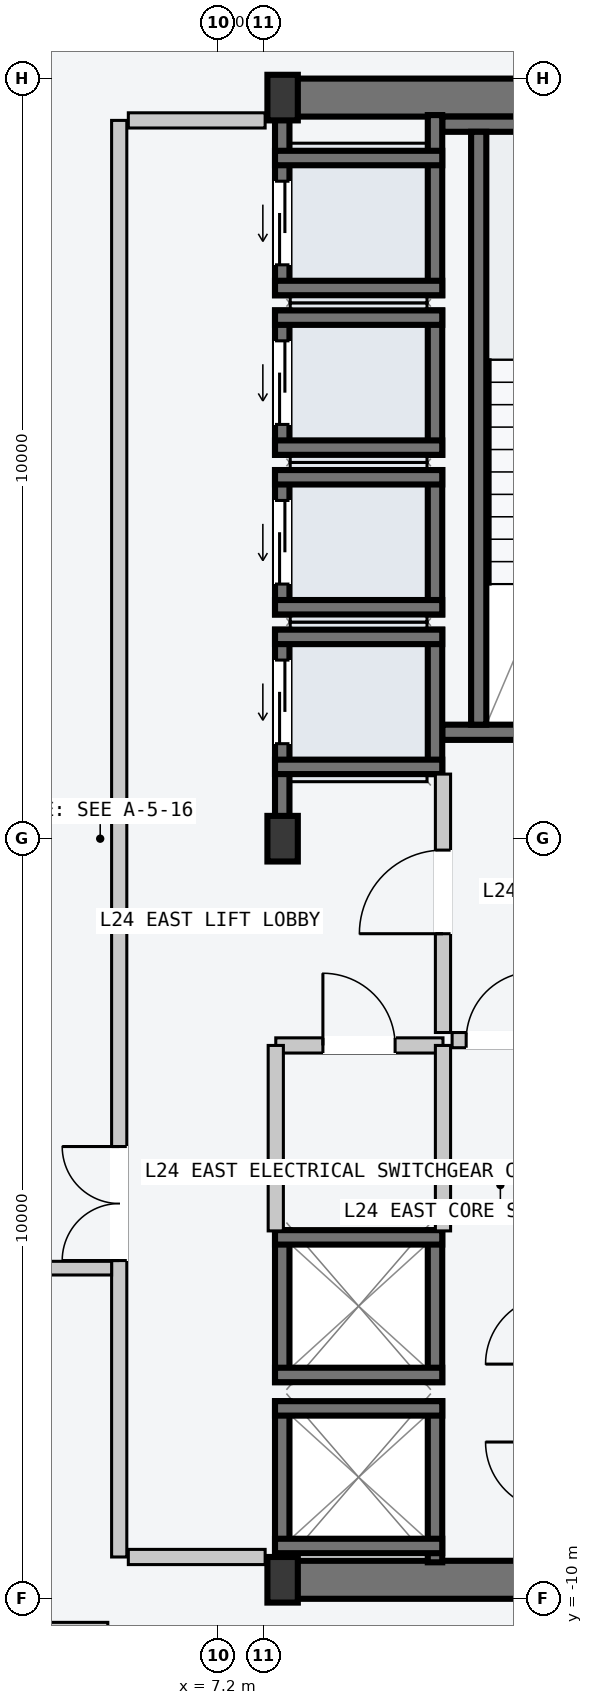
"""IFC4 building model, lengths in metres.
Left out: names, types, materials, properties, quantities, classifications, styles, units other than length and angle.
Written with IfcOpenShell. Run it as: python <this file> out.ifc"""

import sys

from ifc_helpers import new_model, si_unit, direction, frame, frame_2d, origin, origin_2d, place, context, subcontext, project, spatial, rectangle, i_section, extrude, element, fill, save


model = new_model("IFC4")
c1 = context("Model", 3, precision=1e-05, world=origin(), true_north=direction((0.0, 1.0)))
c2 = subcontext(c1, "Body", "Model", "MODEL_VIEW")
j1 = project(units=[si_unit("LENGTHUNIT", "METRE"), si_unit("PLANEANGLEUNIT", "RADIAN")], contexts=[c1])
p1 = place(None, origin())
s1 = spatial("IfcSite", under=j1, at=p1, CompositionType="ELEMENT")
p2 = place(p1, origin())
s2 = spatial("IfcBuilding", under=s1, at=p2, CompositionType="ELEMENT")
p3 = place(p2, frame((0.0, 0.0, 95.4)))
s3 = spatial("IfcBuildingStorey", under=s2, at=p3, CompositionType="ELEMENT", Elevation=95.4)
for number, where, z_axis, x_axis in (
    (1, (8.07, -9.75, -0.2), (0.0, 0.0, 1.0), (1.0, 0.0, 0.0)),
    (2, (8.07, 9.75, -0.2), (0.0, 0.0, 1.0), (1.0, 0.0, 0.0)),
):
    element("IfcWall", number, at=place(p3, frame(where, z_axis=z_axis, x_axis=x_axis)), inside=s3, PredefinedType="SHEAR", context=c2, shape_type="SweptSolid", body=[
        extrude(rectangle(XDim=6.46, YDim=0.5, at=frame_2d((3.23, 0.0))), origin(), (0.0, 0.0, 1.0), 3.6),
    ])
p4 = place(p3, frame((10.15, 1.4, -0.2), z_axis=(0.0, 0.0, 1.0), x_axis=(1.0, 0.0, 0.0)))
e3 = element("IfcWall", 3, at=p4, inside=s3, PredefinedType="SOLIDWALL", context=c2, shape_type="SweptSolid", body=[
    extrude(rectangle(XDim=4.1, YDim=0.2, at=frame_2d((2.05, 0.0))), origin(), (0.0, 0.0, 1.0), 3.6),
])
p5 = place(p4, frame((1.5, 0.0, 0.2)))
e4 = element("IfcOpeningElement", 4, at=p5, cuts=e3, PredefinedType="OPENING", context=c2, shape_type="SweptSolid", body=[
    extrude(rectangle(XDim=1.12, YDim=2.18, at=frame_2d((0.56, 1.09))), frame((0.0, 0.11, 0.0), z_axis=(0.0, -1.0, 0.0), x_axis=(1.0, 0.0, 0.0)), (0.0, 0.0, 1.0), 0.22),
])
p6 = place(p3, frame((10.15, 9.4, -0.2), z_axis=(0.0, 0.0, 1.0), x_axis=(1.0, 0.0, 0.0)))
e5 = element("IfcWall", 5, at=p6, inside=s3, PredefinedType="SOLIDWALL", context=c2, shape_type="SweptSolid", body=[
    extrude(rectangle(XDim=4.1, YDim=0.2, at=frame_2d((2.05, 0.0))), origin(), (0.0, 0.0, 1.0), 3.6),
])
p7 = place(p3, frame((10.63, 1.5, -0.2), z_axis=(0.0, 0.0, 1.0), x_axis=(0.0, 1.0, 0.0)))
e6 = element("IfcWall", 6, at=p7, inside=s3, PredefinedType="SOLIDWALL", context=c2, shape_type="SweptSolid", body=[
    extrude(rectangle(XDim=7.8, YDim=0.2, at=frame_2d((3.9, 0.0))), origin(), (0.0, 0.0, 1.0), 3.6),
])
for number, where, z_axis, x_axis in (
    (7, (8.05, -9.75, 0.0), (0.0, 0.0, 1.0), (1.0, 0.0, 0.0)),
    (8, (8.05, 0.0, 0.0), (0.0, 0.0, 1.0), (1.0, 0.0, 0.0)),
    (9, (8.05, 9.75, 0.0), (0.0, 0.0, 1.0), (1.0, 0.0, 0.0)),
):
    element("IfcColumn", number, at=place(p3, frame(where, z_axis=z_axis, x_axis=x_axis)), inside=s3, PredefinedType="COLUMN", context=c2, shape_type="SweptSolid", body=[
        extrude(i_section(OverallWidth=0.4, OverallDepth=0.6, WebThickness=0.022, FlangeThickness=0.036, at=origin_2d()), origin(), (0.0, 0.0, 1.0), 3.6),
    ])
p8 = place(p3, frame((8.045, 0.21, -0.2), z_axis=(0.0, 0.0, 1.0), x_axis=(0.0, 1.0, 0.0)))
e10 = element("IfcWall", 10, at=p8, inside=s3, PredefinedType="SOLIDWALL", context=c2, shape_type="SweptSolid", body=[
    extrude(rectangle(XDim=2.54, YDim=0.19, at=frame_2d((1.27, 0.0))), origin(), (0.0, 0.0, 1.0), 3.6),
])
p9 = place(p8, frame((1.04, 0.0, 0.2)))
e11 = element("IfcOpeningElement", 11, at=p9, cuts=e10, PredefinedType="OPENING", context=c2, shape_type="SweptSolid", body=[
    extrude(rectangle(XDim=1.1, YDim=2.2, at=frame_2d((0.55, 1.1))), frame((0.0, 0.105, 0.0), z_axis=(0.0, -1.0, 0.0), x_axis=(1.0, 0.0, 0.0)), (0.0, 0.0, 1.0), 0.21),
])
p10 = place(p3, frame((10.055, 0.85, -0.2), z_axis=(0.0, 0.0, 1.0), x_axis=(0.0, 1.0, 0.0)))
e12 = element("IfcWall", 12, at=p10, inside=s3, PredefinedType="SOLIDWALL", context=c2, shape_type="SweptSolid", body=[
    extrude(rectangle(XDim=1.9, YDim=0.19, at=frame_2d((0.95, 0.0))), origin(), (0.0, 0.0, 1.0), 3.6),
])
for number, where, z_axis, x_axis in (
    (13, (7.95, 2.655, -0.2), (0.0, 0.0, 1.0), (1.0, 0.0, 0.0)),
    (14, (7.95, 0.945, -0.2), (0.0, 0.0, 1.0), (1.0, 0.0, 0.0)),
):
    element("IfcWall", number, at=place(p3, frame(where, z_axis=z_axis, x_axis=x_axis)), inside=s3, PredefinedType="SOLIDWALL", context=c2, shape_type="SweptSolid", body=[
        extrude(rectangle(XDim=2.2, YDim=0.19, at=frame_2d((1.1, 0.0))), origin(), (0.0, 0.0, 1.0), 3.6),
    ])
p11 = place(p3, frame((8.045, 2.95, -0.2), z_axis=(0.0, 0.0, 1.0), x_axis=(0.0, 1.0, 0.0)))
e15 = element("IfcWall", 15, at=p11, inside=s3, PredefinedType="SOLIDWALL", context=c2, shape_type="SweptSolid", body=[
    extrude(rectangle(XDim=1.9, YDim=0.19, at=frame_2d((0.95, 0.0))), origin(), (0.0, 0.0, 1.0), 3.6),
])
p12 = place(p11, frame((0.4, 0.0, 0.2)))
e16 = element("IfcOpeningElement", 16, at=p12, cuts=e15, PredefinedType="OPENING", context=c2, shape_type="SweptSolid", body=[
    extrude(rectangle(XDim=1.1, YDim=2.2, at=frame_2d((0.55, 1.1))), frame((0.0, 0.105, 0.0), z_axis=(0.0, -1.0, 0.0), x_axis=(1.0, 0.0, 0.0)), (0.0, 0.0, 1.0), 0.21),
])
p13 = place(p3, frame((10.055, 2.95, -0.2), z_axis=(0.0, 0.0, 1.0), x_axis=(0.0, 1.0, 0.0)))
e17 = element("IfcWall", 17, at=p13, inside=s3, PredefinedType="SOLIDWALL", context=c2, shape_type="SweptSolid", body=[
    extrude(rectangle(XDim=1.9, YDim=0.19, at=frame_2d((0.95, 0.0))), origin(), (0.0, 0.0, 1.0), 3.6),
])
for number, where, z_axis, x_axis in (
    (18, (7.95, 4.755, -0.2), (0.0, 0.0, 1.0), (1.0, 0.0, 0.0)),
    (19, (7.95, 3.045, -0.2), (0.0, 0.0, 1.0), (1.0, 0.0, 0.0)),
):
    element("IfcWall", number, at=place(p3, frame(where, z_axis=z_axis, x_axis=x_axis)), inside=s3, PredefinedType="SOLIDWALL", context=c2, shape_type="SweptSolid", body=[
        extrude(rectangle(XDim=2.2, YDim=0.19, at=frame_2d((1.1, 0.0))), origin(), (0.0, 0.0, 1.0), 3.6),
    ])
p14 = place(p3, frame((8.045, 5.05, -0.2), z_axis=(0.0, 0.0, 1.0), x_axis=(0.0, 1.0, 0.0)))
e20 = element("IfcWall", 20, at=p14, inside=s3, PredefinedType="SOLIDWALL", context=c2, shape_type="SweptSolid", body=[
    extrude(rectangle(XDim=1.9, YDim=0.19, at=frame_2d((0.95, 0.0))), origin(), (0.0, 0.0, 1.0), 3.6),
])
p15 = place(p14, frame((0.4, 0.0, 0.2)))
e21 = element("IfcOpeningElement", 21, at=p15, cuts=e20, PredefinedType="OPENING", context=c2, shape_type="SweptSolid", body=[
    extrude(rectangle(XDim=1.1, YDim=2.2, at=frame_2d((0.55, 1.1))), frame((0.0, 0.105, 0.0), z_axis=(0.0, -1.0, 0.0), x_axis=(1.0, 0.0, 0.0)), (0.0, 0.0, 1.0), 0.21),
])
p16 = place(p3, frame((10.055, 5.05, -0.2), z_axis=(0.0, 0.0, 1.0), x_axis=(0.0, 1.0, 0.0)))
e22 = element("IfcWall", 22, at=p16, inside=s3, PredefinedType="SOLIDWALL", context=c2, shape_type="SweptSolid", body=[
    extrude(rectangle(XDim=1.9, YDim=0.19, at=frame_2d((0.95, 0.0))), origin(), (0.0, 0.0, 1.0), 3.6),
])
for number, where, z_axis, x_axis in (
    (23, (7.95, 6.855, -0.2), (0.0, 0.0, 1.0), (1.0, 0.0, 0.0)),
    (24, (7.95, 5.145, -0.2), (0.0, 0.0, 1.0), (1.0, 0.0, 0.0)),
):
    element("IfcWall", number, at=place(p3, frame(where, z_axis=z_axis, x_axis=x_axis)), inside=s3, PredefinedType="SOLIDWALL", context=c2, shape_type="SweptSolid", body=[
        extrude(rectangle(XDim=2.2, YDim=0.19, at=frame_2d((1.1, 0.0))), origin(), (0.0, 0.0, 1.0), 3.6),
    ])
p17 = place(p3, frame((8.045, 7.15, -0.2), z_axis=(0.0, 0.0, 1.0), x_axis=(0.0, 1.0, 0.0)))
e25 = element("IfcWall", 25, at=p17, inside=s3, PredefinedType="SOLIDWALL", context=c2, shape_type="SweptSolid", body=[
    extrude(rectangle(XDim=2.37, YDim=0.19, at=frame_2d((1.185, 0.0))), origin(), (0.0, 0.0, 1.0), 3.6),
])
p18 = place(p17, frame((0.4, 0.0, 0.2)))
e26 = element("IfcOpeningElement", 26, at=p18, cuts=e25, PredefinedType="OPENING", context=c2, shape_type="SweptSolid", body=[
    extrude(rectangle(XDim=1.1, YDim=2.2, at=frame_2d((0.55, 1.1))), frame((0.0, 0.105, 0.0), z_axis=(0.0, -1.0, 0.0), x_axis=(1.0, 0.0, 0.0)), (0.0, 0.0, 1.0), 0.21),
])
p19 = place(p3, frame((10.055, 7.15, -0.2), z_axis=(0.0, 0.0, 1.0), x_axis=(0.0, 1.0, 0.0)))
e27 = element("IfcWall", 27, at=p19, inside=s3, PredefinedType="SOLIDWALL", context=c2, shape_type="SweptSolid", body=[
    extrude(rectangle(XDim=2.37, YDim=0.19, at=frame_2d((1.185, 0.0))), origin(), (0.0, 0.0, 1.0), 3.6),
])
for number, where, z_axis, x_axis in (
    (28, (7.95, 8.955, -0.2), (0.0, 0.0, 1.0), (1.0, 0.0, 0.0)),
    (29, (7.95, 7.245, -0.2), (0.0, 0.0, 1.0), (1.0, 0.0, 0.0)),
):
    element("IfcWall", number, at=place(p3, frame(where, z_axis=z_axis, x_axis=x_axis)), inside=s3, PredefinedType="SOLIDWALL", context=c2, shape_type="SweptSolid", body=[
        extrude(rectangle(XDim=2.2, YDim=0.19, at=frame_2d((1.1, 0.0))), origin(), (0.0, 0.0, 1.0), 3.6),
    ])
for number, where, z_axis, x_axis in (
    (30, (8.045, -9.52, -0.2), (0.0, 0.0, 1.0), (0.0, 1.0, 0.0)),
    (31, (10.055, -9.52, -0.2), (0.0, 0.0, 1.0), (0.0, 1.0, 0.0)),
):
    element("IfcWall", number, at=place(p3, frame(where, z_axis=z_axis, x_axis=x_axis)), inside=s3, PredefinedType="SOLIDWALL", context=c2, shape_type="SweptSolid", body=[
        extrude(rectangle(XDim=2.12, YDim=0.19, at=frame_2d((1.06, 0.0))), origin(), (0.0, 0.0, 1.0), 3.6),
    ])
for number, where, z_axis, x_axis in (
    (32, (7.95, -7.495, -0.2), (0.0, 0.0, 1.0), (1.0, 0.0, 0.0)),
    (33, (7.95, -9.305, -0.2), (0.0, 0.0, 1.0), (1.0, 0.0, 0.0)),
):
    element("IfcWall", number, at=place(p3, frame(where, z_axis=z_axis, x_axis=x_axis)), inside=s3, PredefinedType="SOLIDWALL", context=c2, shape_type="SweptSolid", body=[
        extrude(rectangle(XDim=2.2, YDim=0.19, at=frame_2d((1.1, 0.0))), origin(), (0.0, 0.0, 1.0), 3.6),
    ])
for number, where, z_axis, x_axis in (
    (34, (8.045, -7.15, -0.2), (0.0, 0.0, 1.0), (0.0, 1.0, 0.0)),
    (35, (10.055, -7.15, -0.2), (0.0, 0.0, 1.0), (0.0, 1.0, 0.0)),
):
    element("IfcWall", number, at=place(p3, frame(where, z_axis=z_axis, x_axis=x_axis)), inside=s3, PredefinedType="SOLIDWALL", context=c2, shape_type="SweptSolid", body=[
        extrude(rectangle(XDim=2.0, YDim=0.19, at=frame_2d((1.0, 0.0))), origin(), (0.0, 0.0, 1.0), 3.6),
    ])
for number, where, z_axis, x_axis in (
    (36, (7.95, -5.245, -0.2), (0.0, 0.0, 1.0), (1.0, 0.0, 0.0)),
    (37, (7.95, -7.055, -0.2), (0.0, 0.0, 1.0), (1.0, 0.0, 0.0)),
):
    element("IfcWall", number, at=place(p3, frame(where, z_axis=z_axis, x_axis=x_axis)), inside=s3, PredefinedType="SOLIDWALL", context=c2, shape_type="SweptSolid", body=[
        extrude(rectangle(XDim=2.2, YDim=0.19, at=frame_2d((1.1, 0.0))), origin(), (0.0, 0.0, 1.0), 3.6),
    ])
p20 = place(p3, frame((5.9, -9.45, 0.0), z_axis=(0.0, 0.0, 1.0), x_axis=(0.0, 1.0, 0.0)))
e38 = element("IfcWall", 38, at=p20, inside=s3, PredefinedType="PARTITIONING", context=c2, shape_type="SweptSolid", body=[
    extrude(rectangle(XDim=18.9, YDim=0.2, at=frame_2d((9.45, 0.0))), origin(), (0.0, 0.0, 1.0), 3.4),
])
p21 = place(p20, frame((3.9, 0.0, 0.0)))
e39 = element("IfcOpeningElement", 39, at=p21, cuts=e38, PredefinedType="OPENING", context=c2, shape_type="SweptSolid", body=[
    extrude(rectangle(XDim=1.5, YDim=2.2, at=frame_2d((0.75, 1.1))), frame((0.0, 0.11, 0.0), z_axis=(0.0, -1.0, 0.0), x_axis=(1.0, 0.0, 0.0)), (0.0, 0.0, 1.0), 0.22),
])
for number, where, z_axis, x_axis in (
    (40, (6.02, -9.45, 0.0), (0.0, 0.0, 1.0), (1.0, 0.0, 0.0)),
    (41, (6.02, 9.45, 0.0), (0.0, 0.0, 1.0), (1.0, 0.0, 0.0)),
):
    element("IfcWall", number, at=place(p3, frame(where, z_axis=z_axis, x_axis=x_axis)), inside=s3, PredefinedType="PARTITIONING", context=c2, shape_type="SweptSolid", body=[
        extrude(rectangle(XDim=1.8, YDim=0.2, at=frame_2d((0.9, 0.0))), origin(), (0.0, 0.0, 1.0), 3.4),
    ])
p22 = place(p3, frame((10.16, -2.55, 0.0), z_axis=(0.0, 0.0, 1.0), x_axis=(0.0, 1.0, 0.0)))
e42 = element("IfcWall", 42, at=p22, inside=s3, PredefinedType="PARTITIONING", context=c2, shape_type="SweptSolid", body=[
    extrude(rectangle(XDim=3.4, YDim=0.2, at=frame_2d((1.7, 0.0))), origin(), (0.0, 0.0, 1.0), 3.4),
])
p23 = place(p22, frame((1.3, 0.0, 0.0)))
e43 = element("IfcOpeningElement", 43, at=p23, cuts=e42, PredefinedType="OPENING", context=c2, shape_type="SweptSolid", body=[
    extrude(rectangle(XDim=1.1, YDim=2.15, at=frame_2d((0.55, 1.075))), frame((0.0, 0.11, 0.0), z_axis=(0.0, -1.0, 0.0), x_axis=(1.0, 0.0, 0.0)), (0.0, 0.0, 1.0), 0.22),
])
p24 = place(p3, frame((10.28, -2.65, 0.0), z_axis=(0.0, 0.0, 1.0), x_axis=(1.0, 0.0, 0.0)))
e44 = element("IfcWall", 44, at=p24, inside=s3, PredefinedType="PARTITIONING", context=c2, shape_type="SweptSolid", body=[
    extrude(rectangle(XDim=1.27, YDim=0.2, at=frame_2d((0.635, 0.0))), origin(), (0.0, 0.0, 1.0), 3.4),
])
p25 = place(p24, frame((0.185, 0.0, 0.0)))
e45 = element("IfcOpeningElement", 45, at=p25, cuts=e44, PredefinedType="OPENING", context=c2, shape_type="SweptSolid", body=[
    extrude(rectangle(XDim=0.9, YDim=2.15, at=frame_2d((0.45, 1.075))), frame((0.0, 0.11, 0.0), z_axis=(0.0, -1.0, 0.0), x_axis=(1.0, 0.0, 0.0)), (0.0, 0.0, 1.0), 0.22),
])
p26 = place(p3, frame((7.96, -2.72, 0.0), z_axis=(0.0, 0.0, 1.0), x_axis=(1.0, 0.0, 0.0)))
e46 = element("IfcWall", 46, at=p26, inside=s3, PredefinedType="PARTITIONING", context=c2, shape_type="SweptSolid", body=[
    extrude(rectangle(XDim=2.2, YDim=0.2, at=frame_2d((1.1, 0.0))), origin(), (0.0, 0.0, 1.0), 3.4),
])
p27 = place(p26, frame((0.62, 0.0, 0.0)))
e47 = element("IfcOpeningElement", 47, at=p27, cuts=e46, PredefinedType="OPENING", context=c2, shape_type="SweptSolid", body=[
    extrude(rectangle(XDim=0.95, YDim=2.1, at=frame_2d((0.475, 1.05))), frame((0.0, 0.11, 0.0), z_axis=(0.0, -1.0, 0.0), x_axis=(1.0, 0.0, 0.0)), (0.0, 0.0, 1.0), 0.22),
])
for number, where, z_axis, x_axis in (
    (48, (7.96, -5.16, 0.0), (0.0, 0.0, 1.0), (0.0, 1.0, 0.0)),
    (49, (10.16, -5.16, 0.0), (0.0, 0.0, 1.0), (0.0, 1.0, 0.0)),
):
    element("IfcWall", number, at=place(p3, frame(where, z_axis=z_axis, x_axis=x_axis)), inside=s3, PredefinedType="PARTITIONING", context=c2, shape_type="SweptSolid", body=[
        extrude(rectangle(XDim=2.44, YDim=0.2, at=frame_2d((1.22, 0.0))), origin(), (0.0, 0.0, 1.0), 3.4),
    ])
p28 = place(p3, frame((-5.8, -5.65, 0.0), z_axis=(0.0, 0.0, 1.0), x_axis=(1.0, 0.0, 0.0)))
e50 = element("IfcWall", 50, at=p28, inside=s3, PredefinedType="PARTITIONING", context=c2, shape_type="SweptSolid", body=[
    extrude(rectangle(XDim=11.6, YDim=0.18, at=frame_2d((5.8, 0.0))), origin(), (0.0, 0.0, 1.0), 3.4),
])
p29 = place(p28, frame((5.1, 0.0, 0.0)))
e51 = element("IfcOpeningElement", 51, at=p29, cuts=e50, PredefinedType="OPENING", context=c2, shape_type="SweptSolid", body=[
    extrude(rectangle(XDim=1.4, YDim=2.2, at=frame_2d((0.7, 1.1))), frame((0.0, 0.1, 0.0), z_axis=(0.0, -1.0, 0.0), x_axis=(1.0, 0.0, 0.0)), (0.0, 0.0, 1.0), 0.2),
])
p30 = place(p3, frame((-5.75, -10.4, 0.0), z_axis=(0.0, 0.0, 1.0), x_axis=(1.0, 0.0, 0.0)))
e52 = element("IfcWall", 52, at=p30, inside=s3, PredefinedType="PARTITIONING", context=c2, shape_type="SweptSolid", body=[
    extrude(rectangle(XDim=11.5, YDim=0.18, at=frame_2d((5.75, 0.0))), origin(), (0.0, 0.0, 1.0), 3.4),
])
p31 = place(p30, frame((5.3, 0.0, 0.0)))
e53 = element("IfcOpeningElement", 53, at=p31, cuts=e52, PredefinedType="OPENING", context=c2, shape_type="SweptSolid", body=[
    extrude(rectangle(XDim=0.9, YDim=2.15, at=frame_2d((0.45, 1.075))), frame((0.0, 0.1, 0.0), z_axis=(0.0, -1.0, 0.0), x_axis=(1.0, 0.0, 0.0)), (0.0, 0.0, 1.0), 0.2),
])
p32 = place(p9, origin())
e54 = element("IfcDoor", 54, at=p32, inside=s3, OperationType="SLIDING_TO_LEFT", PredefinedType="DOOR", context=c2, shape_type="SweptSolid", body=[
    extrude(rectangle(XDim=1.1, YDim=2.2, at=frame_2d((0.55, 1.1))), frame((0.0, 0.025, 0.0), z_axis=(0.0, -1.0, 0.0), x_axis=(1.0, 0.0, 0.0)), (0.0, 0.0, 1.0), 0.05),
])
fill(e11, e54)
p33 = place(p12, origin())
e55 = element("IfcDoor", 55, at=p33, inside=s3, OperationType="SLIDING_TO_LEFT", PredefinedType="DOOR", context=c2, shape_type="SweptSolid", body=[
    extrude(rectangle(XDim=1.1, YDim=2.2, at=frame_2d((0.55, 1.1))), frame((0.0, 0.025, 0.0), z_axis=(0.0, -1.0, 0.0), x_axis=(1.0, 0.0, 0.0)), (0.0, 0.0, 1.0), 0.05),
])
fill(e16, e55)
p34 = place(p15, origin())
e56 = element("IfcDoor", 56, at=p34, inside=s3, OperationType="SLIDING_TO_LEFT", PredefinedType="DOOR", context=c2, shape_type="SweptSolid", body=[
    extrude(rectangle(XDim=1.1, YDim=2.2, at=frame_2d((0.55, 1.1))), frame((0.0, 0.025, 0.0), z_axis=(0.0, -1.0, 0.0), x_axis=(1.0, 0.0, 0.0)), (0.0, 0.0, 1.0), 0.05),
])
fill(e21, e56)
p35 = place(p18, origin())
e57 = element("IfcDoor", 57, at=p35, inside=s3, OperationType="SLIDING_TO_LEFT", PredefinedType="DOOR", context=c2, shape_type="SweptSolid", body=[
    extrude(rectangle(XDim=1.1, YDim=2.2, at=frame_2d((0.55, 1.1))), frame((0.0, 0.025, 0.0), z_axis=(0.0, -1.0, 0.0), x_axis=(1.0, 0.0, 0.0)), (0.0, 0.0, 1.0), 0.05),
])
fill(e26, e57)
p36 = place(p21, origin())
e58 = element("IfcDoor", 58, at=p36, inside=s3, OperationType="DOUBLE_DOOR_SINGLE_SWING", PredefinedType="DOOR", context=c2, shape_type="SweptSolid", body=[
    extrude(rectangle(XDim=1.5, YDim=2.2, at=frame_2d((0.75, 1.1))), frame((0.0, 0.025, 0.0), z_axis=(0.0, -1.0, 0.0), x_axis=(1.0, 0.0, 0.0)), (0.0, 0.0, 1.0), 0.05),
])
fill(e39, e58)
p37 = place(p23, origin())
e59 = element("IfcDoor", 59, at=p37, inside=s3, OperationType="SINGLE_SWING_LEFT", PredefinedType="DOOR", context=c2, shape_type="SweptSolid", body=[
    extrude(rectangle(XDim=1.1, YDim=2.15, at=frame_2d((0.55, 1.075))), frame((0.0, 0.025, 0.0), z_axis=(0.0, -1.0, 0.0), x_axis=(1.0, 0.0, 0.0)), (0.0, 0.0, 1.0), 0.05),
])
fill(e43, e59)
p38 = place(p25, origin())
e60 = element("IfcDoor", 60, at=p38, inside=s3, OperationType="SINGLE_SWING_RIGHT", PredefinedType="DOOR", context=c2, shape_type="SweptSolid", body=[
    extrude(rectangle(XDim=0.9, YDim=2.15, at=frame_2d((0.45, 1.075))), frame((0.0, 0.025, 0.0), z_axis=(0.0, -1.0, 0.0), x_axis=(1.0, 0.0, 0.0)), (0.0, 0.0, 1.0), 0.05),
])
fill(e45, e60)
p39 = place(p27, origin())
e61 = element("IfcDoor", 61, at=p39, inside=s3, OperationType="SINGLE_SWING_LEFT", PredefinedType="DOOR", context=c2, shape_type="SweptSolid", body=[
    extrude(rectangle(XDim=0.95, YDim=2.1, at=frame_2d((0.475, 1.05))), frame((0.0, 0.025, 0.0), z_axis=(0.0, -1.0, 0.0), x_axis=(1.0, 0.0, 0.0)), (0.0, 0.0, 1.0), 0.05),
])
fill(e47, e61)
save(model, sys.argv[1])
